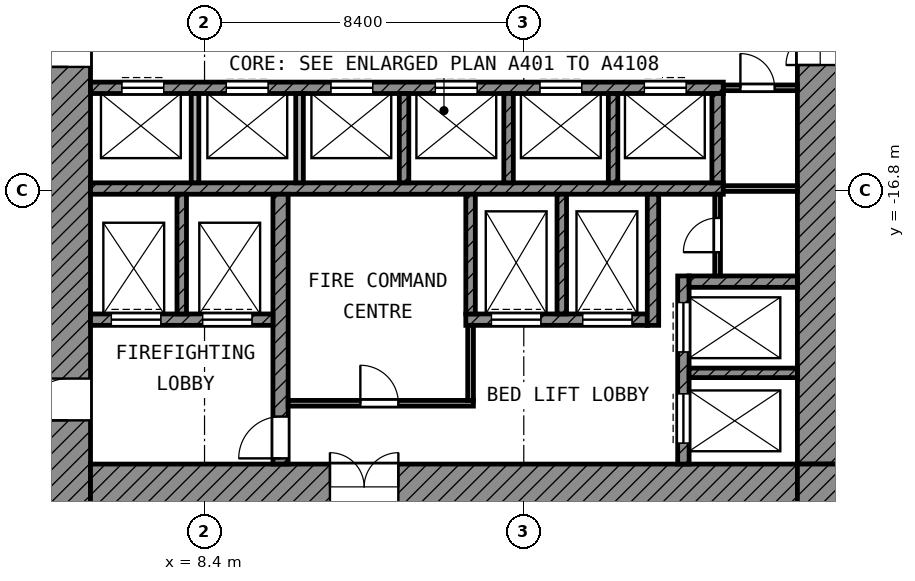
"""IFC4 building model, lengths in metres.
Left out: names, types, materials, properties, quantities, classifications, styles, units other than length and angle.
Written with IfcOpenShell. Run it as: python <this file> out.ifc"""

import sys

from ifc_helpers import new_model, si_unit, direction, frame, frame_2d, origin, place, context, subcontext, project, spatial, rectangle, extrude, element, fill, save


model = new_model("IFC4")
c1 = context("Model", 3, precision=1e-05, world=origin(), true_north=direction((0.0, 1.0)))
c2 = subcontext(c1, "Body", "Model", "MODEL_VIEW")
j1 = project(units=[si_unit("LENGTHUNIT", "METRE"), si_unit("PLANEANGLEUNIT", "RADIAN")], contexts=[c1])
p1 = place(None, origin())
s1 = spatial("IfcSite", under=j1, at=p1, CompositionType="ELEMENT")
p2 = place(p1, origin())
s2 = spatial("IfcBuilding", under=s1, at=p2, CompositionType="ELEMENT")
p3 = place(p2, origin())
s3 = spatial("IfcBuildingStorey", under=s2, at=p3, CompositionType="ELEMENT", Elevation=0.0)
p4 = place(p3, frame((4.8, -25.2, 0.0), z_axis=(0.0, 0.0, 1.0), x_axis=(0.0, 1.0, 0.0)))
e1 = element("IfcWall", 1, at=p4, inside=s3, PredefinedType="SHEAR", context=c2, shape_type="SweptSolid", body=[
    extrude(rectangle(XDim=19.8, YDim=1.2, at=frame_2d((9.9, 0.0))), origin(), (0.0, 0.0, 1.0), 6.65),
])
p5 = place(p4, frame((11.65, 0.0, 0.0)))
e2 = element("IfcOpeningElement", 2, at=p5, cuts=e1, PredefinedType="OPENING", context=c2, shape_type="SweptSolid", body=[
    extrude(rectangle(XDim=1.1, YDim=2.1, at=frame_2d((0.55, 1.05))), frame((0.0, 0.61, 0.0), z_axis=(0.0, -1.0, 0.0), x_axis=(1.0, 0.0, 0.0)), (0.0, 0.0, 1.0), 1.22),
])
p6 = place(p4, frame((2.35, 0.0, 0.0)))
e3 = element("IfcOpeningElement", 3, at=p6, cuts=e1, PredefinedType="OPENING", context=c2, shape_type="SweptSolid", body=[
    extrude(rectangle(XDim=1.1, YDim=2.1, at=frame_2d((0.55, 1.05))), frame((0.0, 0.61, 0.0), z_axis=(0.0, -1.0, 0.0), x_axis=(1.0, 0.0, 0.0)), (0.0, 0.0, 1.0), 1.22),
])
p7 = place(p3, frame((24.6, -24.0, 0.0), z_axis=(0.0, 0.0, 1.0), x_axis=(0.0, 1.0, 0.0)))
e4 = element("IfcWall", 4, at=p7, inside=s3, PredefinedType="SHEAR", context=c2, shape_type="SweptSolid", body=[
    extrude(rectangle(XDim=18.6, YDim=1.2, at=frame_2d((9.3, 0.0))), origin(), (0.0, 0.0, 1.0), 6.65),
])
p8 = place(p7, frame((10.5, 0.0, 0.0)))
e5 = element("IfcOpeningElement", 5, at=p8, cuts=e4, PredefinedType="OPENING", context=c2, shape_type="SweptSolid", body=[
    extrude(rectangle(XDim=1.8, YDim=2.1, at=frame_2d((0.9, 1.05))), frame((0.0, 0.61, 0.0), z_axis=(0.0, -1.0, 0.0), x_axis=(1.0, 0.0, 0.0)), (0.0, 0.0, 1.0), 1.22),
])
p9 = place(p3, frame((5.4, -24.6, 0.0), z_axis=(0.0, 0.0, 1.0), x_axis=(1.0, 0.0, 0.0)))
e6 = element("IfcWall", 6, at=p9, inside=s3, PredefinedType="SHEAR", context=c2, shape_type="SweptSolid", body=[
    extrude(rectangle(XDim=18.6, YDim=1.2, at=frame_2d((9.3, 0.0))), origin(), (0.0, 0.0, 1.0), 6.65),
])
p10 = place(p9, frame((6.3, 0.0, 0.0)))
e7 = element("IfcOpeningElement", 7, at=p10, cuts=e6, PredefinedType="OPENING", context=c2, shape_type="SweptSolid", body=[
    extrude(rectangle(XDim=1.8, YDim=2.1, at=frame_2d((0.9, 1.05))), frame((0.0, 0.61, 0.0), z_axis=(0.0, -1.0, 0.0), x_axis=(1.0, 0.0, 0.0)), (0.0, 0.0, 1.0), 1.22),
])
p11 = place(p3, frame((24.6, -25.2, 0.0), z_axis=(0.0, 0.0, 1.0), x_axis=(0.0, 1.0, 0.0)))
e8 = element("IfcWall", 8, at=p11, inside=s3, PredefinedType="SHEAR", context=c2, shape_type="SweptSolid", body=[
    extrude(rectangle(XDim=1.2, YDim=1.2, at=frame_2d((0.6, 0.0))), origin(), (0.0, 0.0, 1.0), 6.65),
])
p12 = place(p3, frame((5.4, -14.1, 0.0), z_axis=(0.0, 0.0, 1.0), x_axis=(1.0, 0.0, 0.0)))
e9 = element("IfcWall", 9, at=p12, inside=s3, PredefinedType="SHEAR", context=c2, shape_type="SweptSolid", body=[
    extrude(rectangle(XDim=16.65, YDim=0.3, at=frame_2d((8.325, 0.0))), origin(), (0.0, 0.0, 1.0), 6.65),
])
p13 = place(p12, frame((0.825, 0.0, 0.0)))
e10 = element("IfcOpeningElement", 10, at=p13, cuts=e9, PredefinedType="OPENING", context=c2, shape_type="SweptSolid", body=[
    extrude(rectangle(XDim=1.1, YDim=2.1, at=frame_2d((0.55, 1.05))), frame((0.0, 0.16, 0.0), z_axis=(0.0, -1.0, 0.0), x_axis=(1.0, 0.0, 0.0)), (0.0, 0.0, 1.0), 0.32),
])
p14 = place(p12, frame((3.575, 0.0, 0.0)))
e11 = element("IfcOpeningElement", 11, at=p14, cuts=e9, PredefinedType="OPENING", context=c2, shape_type="SweptSolid", body=[
    extrude(rectangle(XDim=1.1, YDim=2.1, at=frame_2d((0.55, 1.05))), frame((0.0, 0.16, 0.0), z_axis=(0.0, -1.0, 0.0), x_axis=(1.0, 0.0, 0.0)), (0.0, 0.0, 1.0), 0.32),
])
p15 = place(p12, frame((6.325, 0.0, 0.0)))
e12 = element("IfcOpeningElement", 12, at=p15, cuts=e9, PredefinedType="OPENING", context=c2, shape_type="SweptSolid", body=[
    extrude(rectangle(XDim=1.1, YDim=2.1, at=frame_2d((0.55, 1.05))), frame((0.0, 0.16, 0.0), z_axis=(0.0, -1.0, 0.0), x_axis=(1.0, 0.0, 0.0)), (0.0, 0.0, 1.0), 0.32),
])
p16 = place(p12, frame((9.075, 0.0, 0.0)))
e13 = element("IfcOpeningElement", 13, at=p16, cuts=e9, PredefinedType="OPENING", context=c2, shape_type="SweptSolid", body=[
    extrude(rectangle(XDim=1.1, YDim=2.1, at=frame_2d((0.55, 1.05))), frame((0.0, 0.16, 0.0), z_axis=(0.0, -1.0, 0.0), x_axis=(1.0, 0.0, 0.0)), (0.0, 0.0, 1.0), 0.32),
])
p17 = place(p12, frame((11.825, 0.0, 0.0)))
e14 = element("IfcOpeningElement", 14, at=p17, cuts=e9, PredefinedType="OPENING", context=c2, shape_type="SweptSolid", body=[
    extrude(rectangle(XDim=1.1, YDim=2.1, at=frame_2d((0.55, 1.05))), frame((0.0, 0.16, 0.0), z_axis=(0.0, -1.0, 0.0), x_axis=(1.0, 0.0, 0.0)), (0.0, 0.0, 1.0), 0.32),
])
p18 = place(p12, frame((14.575, 0.0, 0.0)))
e15 = element("IfcOpeningElement", 15, at=p18, cuts=e9, PredefinedType="OPENING", context=c2, shape_type="SweptSolid", body=[
    extrude(rectangle(XDim=1.1, YDim=2.1, at=frame_2d((0.55, 1.05))), frame((0.0, 0.16, 0.0), z_axis=(0.0, -1.0, 0.0), x_axis=(1.0, 0.0, 0.0)), (0.0, 0.0, 1.0), 0.32),
])
p19 = place(p3, frame((5.4, -16.75, 0.0), z_axis=(0.0, 0.0, 1.0), x_axis=(1.0, 0.0, 0.0)))
e16 = element("IfcWall", 16, at=p19, inside=s3, PredefinedType="SHEAR", context=c2, shape_type="SweptSolid", body=[
    extrude(rectangle(XDim=16.65, YDim=0.3, at=frame_2d((8.325, 0.0))), origin(), (0.0, 0.0, 1.0), 6.65),
])
p20 = place(p3, frame((5.4, -20.2, 0.0), z_axis=(0.0, 0.0, 1.0), x_axis=(1.0, 0.0, 0.0)))
e17 = element("IfcWall", 17, at=p20, inside=s3, PredefinedType="SHEAR", context=c2, shape_type="SweptSolid", body=[
    extrude(rectangle(XDim=4.8, YDim=0.3, at=frame_2d((2.4, 0.0))), origin(), (0.0, 0.0, 1.0), 6.65),
])
p21 = place(p20, frame((0.55, 0.0, 0.0)))
e18 = element("IfcOpeningElement", 18, at=p21, cuts=e17, PredefinedType="OPENING", context=c2, shape_type="SweptSolid", body=[
    extrude(rectangle(XDim=1.3, YDim=2.1, at=frame_2d((0.65, 1.05))), frame((0.0, 0.16, 0.0), z_axis=(0.0, -1.0, 0.0), x_axis=(1.0, 0.0, 0.0)), (0.0, 0.0, 1.0), 0.32),
])
p22 = place(p20, frame((2.95, 0.0, 0.0)))
e19 = element("IfcOpeningElement", 19, at=p22, cuts=e17, PredefinedType="OPENING", context=c2, shape_type="SweptSolid", body=[
    extrude(rectangle(XDim=1.3, YDim=2.1, at=frame_2d((0.65, 1.05))), frame((0.0, 0.16, 0.0), z_axis=(0.0, -1.0, 0.0), x_axis=(1.0, 0.0, 0.0)), (0.0, 0.0, 1.0), 0.32),
])
p23 = place(p3, frame((15.275, -20.2, 0.0), z_axis=(0.0, 0.0, 1.0), x_axis=(1.0, 0.0, 0.0)))
e20 = element("IfcWall", 20, at=p23, inside=s3, PredefinedType="SHEAR", context=c2, shape_type="SweptSolid", body=[
    extrude(rectangle(XDim=4.775, YDim=0.3, at=frame_2d((2.388, 0.0))), origin(), (0.0, 0.0, 1.0), 6.65),
])
p24 = place(p23, frame((0.675, 0.0, 0.0)))
e21 = element("IfcOpeningElement", 21, at=p24, cuts=e20, PredefinedType="OPENING", context=c2, shape_type="SweptSolid", body=[
    extrude(rectangle(XDim=1.3, YDim=2.1, at=frame_2d((0.65, 1.05))), frame((0.0, 0.16, 0.0), z_axis=(0.0, -1.0, 0.0), x_axis=(1.0, 0.0, 0.0)), (0.0, 0.0, 1.0), 0.32),
])
p25 = place(p23, frame((3.075, 0.0, 0.0)))
e22 = element("IfcOpeningElement", 22, at=p25, cuts=e20, PredefinedType="OPENING", context=c2, shape_type="SweptSolid", body=[
    extrude(rectangle(XDim=1.3, YDim=2.1, at=frame_2d((0.65, 1.05))), frame((0.0, 0.16, 0.0), z_axis=(0.0, -1.0, 0.0), x_axis=(1.0, 0.0, 0.0)), (0.0, 0.0, 1.0), 0.32),
])
p26 = place(p3, frame((10.4, -24.0, 0.0), z_axis=(0.0, 0.0, 1.0), x_axis=(0.0, 1.0, 0.0)))
e23 = element("IfcWall", 23, at=p26, inside=s3, PredefinedType="SHEAR", context=c2, shape_type="SweptSolid", body=[
    extrude(rectangle(XDim=7.1, YDim=0.4, at=frame_2d((3.55, 0.0))), origin(), (0.0, 0.0, 1.0), 6.65),
])
p27 = place(p26, frame((0.15, 0.0, 0.0)))
e24 = element("IfcOpeningElement", 24, at=p27, cuts=e23, PredefinedType="OPENING", context=c2, shape_type="SweptSolid", body=[
    extrude(rectangle(XDim=1.1, YDim=2.1, at=frame_2d((0.55, 1.05))), frame((0.0, 0.21, 0.0), z_axis=(0.0, -1.0, 0.0), x_axis=(1.0, 0.0, 0.0)), (0.0, 0.0, 1.0), 0.42),
])
p28 = place(p3, frame((20.2, -20.35, 0.0), z_axis=(0.0, 0.0, 1.0), x_axis=(0.0, 1.0, 0.0)))
e25 = element("IfcWall", 25, at=p28, inside=s3, PredefinedType="SHEAR", context=c2, shape_type="SweptSolid", body=[
    extrude(rectangle(XDim=3.45, YDim=0.3, at=frame_2d((1.725, 0.0))), origin(), (0.0, 0.0, 1.0), 6.65),
])
p29 = place(p3, frame((21.9, -16.6, 0.0), z_axis=(0.0, 0.0, 1.0), x_axis=(0.0, 1.0, 0.0)))
e26 = element("IfcWall", 26, at=p29, inside=s3, PredefinedType="SHEAR", context=c2, shape_type="SweptSolid", body=[
    extrude(rectangle(XDim=2.35, YDim=0.3, at=frame_2d((1.175, 0.0))), origin(), (0.0, 0.0, 1.0), 6.65),
])
p30 = place(p3, frame((21.15, -19.2, 0.0), z_axis=(0.0, 0.0, 1.0), x_axis=(1.0, 0.0, 0.0)))
e27 = element("IfcWall", 27, at=p30, inside=s3, PredefinedType="SHEAR", context=c2, shape_type="SweptSolid", body=[
    extrude(rectangle(XDim=2.85, YDim=0.3, at=frame_2d((1.425, 0.0))), origin(), (0.0, 0.0, 1.0), 6.65),
])
p31 = place(p3, frame((21.0, -24.0, 0.0), z_axis=(0.0, 0.0, 1.0), x_axis=(0.0, 1.0, 0.0)))
e28 = element("IfcWall", 28, at=p31, inside=s3, PredefinedType="SHEAR", context=c2, shape_type="SweptSolid", body=[
    extrude(rectangle(XDim=4.95, YDim=0.3, at=frame_2d((2.475, 0.0))), origin(), (0.0, 0.0, 1.0), 6.65),
])
p32 = place(p31, frame((2.95, 0.0, 0.0)))
e29 = element("IfcOpeningElement", 29, at=p32, cuts=e28, PredefinedType="OPENING", context=c2, shape_type="SweptSolid", body=[
    extrude(rectangle(XDim=1.3, YDim=2.1, at=frame_2d((0.65, 1.05))), frame((0.0, 0.16, 0.0), z_axis=(0.0, -1.0, 0.0), x_axis=(1.0, 0.0, 0.0)), (0.0, 0.0, 1.0), 0.32),
])
p33 = place(p31, frame((0.55, 0.0, 0.0)))
e30 = element("IfcOpeningElement", 30, at=p33, cuts=e28, PredefinedType="OPENING", context=c2, shape_type="SweptSolid", body=[
    extrude(rectangle(XDim=1.3, YDim=2.1, at=frame_2d((0.65, 1.05))), frame((0.0, 0.16, 0.0), z_axis=(0.0, -1.0, 0.0), x_axis=(1.0, 0.0, 0.0)), (0.0, 0.0, 1.0), 0.32),
])
p34 = place(p3, frame((21.15, -21.6, 0.0), z_axis=(0.0, 0.0, 1.0), x_axis=(1.0, 0.0, 0.0)))
e31 = element("IfcWall", 31, at=p34, inside=s3, PredefinedType="SHEAR", context=c2, shape_type="SweptSolid", body=[
    extrude(rectangle(XDim=2.85, YDim=0.25, at=frame_2d((1.425, 0.0))), origin(), (0.0, 0.0, 1.0), 6.65),
])
for number, where, z_axis, x_axis in (
    (32, (7.8, -20.05, 0.0), (0.0, 0.0, 1.0), (0.0, 1.0, 0.0)),
    (33, (15.4, -20.05, 0.0), (0.0, 0.0, 1.0), (0.0, 1.0, 0.0)),
    (34, (17.8, -20.05, 0.0), (0.0, 0.0, 1.0), (0.0, 1.0, 0.0)),
):
    element("IfcWall", number, at=place(p3, frame(where, z_axis=z_axis, x_axis=x_axis)), inside=s3, PredefinedType="SHEAR", context=c2, shape_type="SweptSolid", body=[
        extrude(rectangle(XDim=3.15, YDim=0.25, at=frame_2d((1.575, 0.0))), origin(), (0.0, 0.0, 1.0), 6.65),
    ])
for number, where, z_axis, x_axis in (
    (35, (8.15, -16.6, 0.0), (0.0, 0.0, 1.0), (0.0, 1.0, 0.0)),
    (36, (10.9, -16.6, 0.0), (0.0, 0.0, 1.0), (0.0, 1.0, 0.0)),
):
    element("IfcWall", number, at=place(p3, frame(where, z_axis=z_axis, x_axis=x_axis)), inside=s3, PredefinedType="PARTITIONING", context=c2, shape_type="SweptSolid", body=[
        extrude(rectangle(XDim=2.35, YDim=0.2, at=frame_2d((1.175, 0.0))), origin(), (0.0, 0.0, 1.0), 6.65),
    ])
for number, where, z_axis, x_axis in (
    (37, (13.65, -16.6, 0.0), (0.0, 0.0, 1.0), (0.0, 1.0, 0.0)),
    (38, (16.4, -16.6, 0.0), (0.0, 0.0, 1.0), (0.0, 1.0, 0.0)),
    (39, (19.15, -16.6, 0.0), (0.0, 0.0, 1.0), (0.0, 1.0, 0.0)),
):
    element("IfcWall", number, at=place(p3, frame(where, z_axis=z_axis, x_axis=x_axis)), inside=s3, PredefinedType="SHEAR", context=c2, shape_type="SweptSolid", body=[
        extrude(rectangle(XDim=2.35, YDim=0.25, at=frame_2d((1.175, 0.0))), origin(), (0.0, 0.0, 1.0), 6.65),
    ])
p35 = place(p3, frame((21.9, -19.05, 0.0), z_axis=(0.0, 0.0, 1.0), x_axis=(0.0, 1.0, 0.0)))
e40 = element("IfcWall", 40, at=p35, inside=s3, PredefinedType="PARTITIONING", context=c2, shape_type="SweptSolid", body=[
    extrude(rectangle(XDim=2.15, YDim=0.15, at=frame_2d((1.075, 0.0))), origin(), (0.0, 0.0, 1.0), 6.65),
])
p36 = place(p35, frame((0.625, 0.0, 0.0)))
e41 = element("IfcOpeningElement", 41, at=p36, cuts=e40, PredefinedType="OPENING", context=c2, shape_type="SweptSolid", body=[
    extrude(rectangle(XDim=0.9, YDim=2.1, at=frame_2d((0.45, 1.05))), frame((0.0, 0.085, 0.0), z_axis=(0.0, -1.0, 0.0), x_axis=(1.0, 0.0, 0.0)), (0.0, 0.0, 1.0), 0.17),
])
p37 = place(p3, frame((10.6, -22.4, 0.0), z_axis=(0.0, 0.0, 1.0), x_axis=(1.0, 0.0, 0.0)))
e42 = element("IfcWall", 42, at=p37, inside=s3, PredefinedType="PARTITIONING", context=c2, shape_type="SweptSolid", body=[
    extrude(rectangle(XDim=4.875, YDim=0.15, at=frame_2d((2.438, 0.0))), origin(), (0.0, 0.0, 1.0), 6.65),
])
p38 = place(p37, frame((1.9, 0.0, 0.0)))
e43 = element("IfcOpeningElement", 43, at=p38, cuts=e42, PredefinedType="OPENING", context=c2, shape_type="SweptSolid", body=[
    extrude(rectangle(XDim=1.0, YDim=2.1, at=frame_2d((0.5, 1.05))), frame((0.0, 0.085, 0.0), z_axis=(0.0, -1.0, 0.0), x_axis=(1.0, 0.0, 0.0)), (0.0, 0.0, 1.0), 0.17),
])
p39 = place(p3, frame((22.05, -16.75, 0.0), z_axis=(0.0, 0.0, 1.0), x_axis=(1.0, 0.0, 0.0)))
e44 = element("IfcWall", 44, at=p39, inside=s3, PredefinedType="PARTITIONING", context=c2, shape_type="SweptSolid", body=[
    extrude(rectangle(XDim=1.95, YDim=0.15, at=frame_2d((0.975, 0.0))), origin(), (0.0, 0.0, 1.0), 6.65),
])
p40 = place(p3, frame((22.05, -14.1, 0.0), z_axis=(0.0, 0.0, 1.0), x_axis=(1.0, 0.0, 0.0)))
e45 = element("IfcWall", 45, at=p40, inside=s3, PredefinedType="PARTITIONING", context=c2, shape_type="SweptSolid", body=[
    extrude(rectangle(XDim=1.95, YDim=0.15, at=frame_2d((0.975, 0.0))), origin(), (0.0, 0.0, 1.0), 6.65),
])
p41 = place(p40, frame((0.45, 0.0, 0.0)))
e46 = element("IfcOpeningElement", 46, at=p41, cuts=e45, PredefinedType="OPENING", context=c2, shape_type="SweptSolid", body=[
    extrude(rectangle(XDim=0.9, YDim=2.1, at=frame_2d((0.45, 1.05))), frame((0.0, 0.085, 0.0), z_axis=(0.0, -1.0, 0.0), x_axis=(1.0, 0.0, 0.0)), (0.0, 0.0, 1.0), 0.17),
])
p42 = place(p3, frame((15.4, -22.325, 0.0), z_axis=(0.0, 0.0, 1.0), x_axis=(0.0, 1.0, 0.0)))
e47 = element("IfcWall", 47, at=p42, inside=s3, PredefinedType="PARTITIONING", context=c2, shape_type="SweptSolid", body=[
    extrude(rectangle(XDim=1.975, YDim=0.15, at=frame_2d((0.987, 0.0))), origin(), (0.0, 0.0, 1.0), 6.65),
])
p43 = place(p13, origin())
e48 = element("IfcDoor", 48, at=p43, inside=s3, OperationType="DOUBLE_DOOR_SLIDING", PredefinedType="DOOR", context=c2, shape_type="SweptSolid", body=[
    extrude(rectangle(XDim=1.1, YDim=2.1, at=frame_2d((0.55, 1.05))), frame((0.0, 0.025, 0.0), z_axis=(0.0, -1.0, 0.0), x_axis=(1.0, 0.0, 0.0)), (0.0, 0.0, 1.0), 0.05),
])
fill(e10, e48)
p44 = place(p14, origin())
e49 = element("IfcDoor", 49, at=p44, inside=s3, OperationType="DOUBLE_DOOR_SLIDING", PredefinedType="DOOR", context=c2, shape_type="SweptSolid", body=[
    extrude(rectangle(XDim=1.1, YDim=2.1, at=frame_2d((0.55, 1.05))), frame((0.0, 0.025, 0.0), z_axis=(0.0, -1.0, 0.0), x_axis=(1.0, 0.0, 0.0)), (0.0, 0.0, 1.0), 0.05),
])
fill(e11, e49)
p45 = place(p15, origin())
e50 = element("IfcDoor", 50, at=p45, inside=s3, OperationType="DOUBLE_DOOR_SLIDING", PredefinedType="DOOR", context=c2, shape_type="SweptSolid", body=[
    extrude(rectangle(XDim=1.1, YDim=2.1, at=frame_2d((0.55, 1.05))), frame((0.0, 0.025, 0.0), z_axis=(0.0, -1.0, 0.0), x_axis=(1.0, 0.0, 0.0)), (0.0, 0.0, 1.0), 0.05),
])
fill(e12, e50)
p46 = place(p16, origin())
e51 = element("IfcDoor", 51, at=p46, inside=s3, OperationType="DOUBLE_DOOR_SLIDING", PredefinedType="DOOR", context=c2, shape_type="SweptSolid", body=[
    extrude(rectangle(XDim=1.1, YDim=2.1, at=frame_2d((0.55, 1.05))), frame((0.0, 0.025, 0.0), z_axis=(0.0, -1.0, 0.0), x_axis=(1.0, 0.0, 0.0)), (0.0, 0.0, 1.0), 0.05),
])
fill(e13, e51)
p47 = place(p17, origin())
e52 = element("IfcDoor", 52, at=p47, inside=s3, OperationType="DOUBLE_DOOR_SLIDING", PredefinedType="DOOR", context=c2, shape_type="SweptSolid", body=[
    extrude(rectangle(XDim=1.1, YDim=2.1, at=frame_2d((0.55, 1.05))), frame((0.0, 0.025, 0.0), z_axis=(0.0, -1.0, 0.0), x_axis=(1.0, 0.0, 0.0)), (0.0, 0.0, 1.0), 0.05),
])
fill(e14, e52)
p48 = place(p18, origin())
e53 = element("IfcDoor", 53, at=p48, inside=s3, OperationType="DOUBLE_DOOR_SLIDING", PredefinedType="DOOR", context=c2, shape_type="SweptSolid", body=[
    extrude(rectangle(XDim=1.1, YDim=2.1, at=frame_2d((0.55, 1.05))), frame((0.0, 0.025, 0.0), z_axis=(0.0, -1.0, 0.0), x_axis=(1.0, 0.0, 0.0)), (0.0, 0.0, 1.0), 0.05),
])
fill(e15, e53)
p49 = place(p32, origin())
e54 = element("IfcDoor", 54, at=p49, inside=s3, OperationType="DOUBLE_DOOR_SLIDING", PredefinedType="DOOR", context=c2, shape_type="SweptSolid", body=[
    extrude(rectangle(XDim=1.3, YDim=2.1, at=frame_2d((0.65, 1.05))), frame((0.0, 0.025, 0.0), z_axis=(0.0, -1.0, 0.0), x_axis=(1.0, 0.0, 0.0)), (0.0, 0.0, 1.0), 0.05),
])
fill(e29, e54)
p50 = place(p33, origin())
e55 = element("IfcDoor", 55, at=p50, inside=s3, OperationType="DOUBLE_DOOR_SLIDING", PredefinedType="DOOR", context=c2, shape_type="SweptSolid", body=[
    extrude(rectangle(XDim=1.3, YDim=2.1, at=frame_2d((0.65, 1.05))), frame((0.0, 0.025, 0.0), z_axis=(0.0, -1.0, 0.0), x_axis=(1.0, 0.0, 0.0)), (0.0, 0.0, 1.0), 0.05),
])
fill(e30, e55)
p51 = place(p24, origin())
e56 = element("IfcDoor", 56, at=p51, inside=s3, OperationType="DOUBLE_DOOR_SLIDING", PredefinedType="DOOR", context=c2, shape_type="SweptSolid", body=[
    extrude(rectangle(XDim=1.3, YDim=2.1, at=frame_2d((0.65, 1.05))), frame((0.0, 0.025, 0.0), z_axis=(0.0, -1.0, 0.0), x_axis=(1.0, 0.0, 0.0)), (0.0, 0.0, 1.0), 0.05),
])
fill(e21, e56)
p52 = place(p25, origin())
e57 = element("IfcDoor", 57, at=p52, inside=s3, OperationType="DOUBLE_DOOR_SLIDING", PredefinedType="DOOR", context=c2, shape_type="SweptSolid", body=[
    extrude(rectangle(XDim=1.3, YDim=2.1, at=frame_2d((0.65, 1.05))), frame((0.0, 0.025, 0.0), z_axis=(0.0, -1.0, 0.0), x_axis=(1.0, 0.0, 0.0)), (0.0, 0.0, 1.0), 0.05),
])
fill(e22, e57)
p53 = place(p21, origin())
e58 = element("IfcDoor", 58, at=p53, inside=s3, OperationType="DOUBLE_DOOR_SLIDING", PredefinedType="DOOR", context=c2, shape_type="SweptSolid", body=[
    extrude(rectangle(XDim=1.3, YDim=2.1, at=frame_2d((0.65, 1.05))), frame((0.0, 0.025, 0.0), z_axis=(0.0, -1.0, 0.0), x_axis=(1.0, 0.0, 0.0)), (0.0, 0.0, 1.0), 0.05),
])
fill(e18, e58)
p54 = place(p22, origin())
e59 = element("IfcDoor", 59, at=p54, inside=s3, OperationType="DOUBLE_DOOR_SLIDING", PredefinedType="DOOR", context=c2, shape_type="SweptSolid", body=[
    extrude(rectangle(XDim=1.3, YDim=2.1, at=frame_2d((0.65, 1.05))), frame((0.0, 0.025, 0.0), z_axis=(0.0, -1.0, 0.0), x_axis=(1.0, 0.0, 0.0)), (0.0, 0.0, 1.0), 0.05),
])
fill(e19, e59)
p55 = place(p5, origin())
e60 = element("IfcDoor", 60, at=p55, inside=s3, OperationType="SINGLE_SWING_LEFT", PredefinedType="DOOR", context=c2, shape_type="SweptSolid", body=[
    extrude(rectangle(XDim=1.1, YDim=2.1, at=frame_2d((0.55, 1.05))), frame((0.0, 0.025, 0.0), z_axis=(0.0, -1.0, 0.0), x_axis=(1.0, 0.0, 0.0)), (0.0, 0.0, 1.0), 0.05),
])
fill(e2, e60)
p56 = place(p6, origin())
e61 = element("IfcDoor", 61, at=p56, inside=s3, OperationType="SINGLE_SWING_LEFT", PredefinedType="DOOR", context=c2, shape_type="SweptSolid", body=[
    extrude(rectangle(XDim=1.1, YDim=2.1, at=frame_2d((0.55, 1.05))), frame((0.0, 0.025, 0.0), z_axis=(0.0, -1.0, 0.0), x_axis=(1.0, 0.0, 0.0)), (0.0, 0.0, 1.0), 0.05),
])
fill(e3, e61)
p57 = place(p27, origin())
e62 = element("IfcDoor", 62, at=p57, inside=s3, OperationType="SINGLE_SWING_LEFT", PredefinedType="DOOR", context=c2, shape_type="SweptSolid", body=[
    extrude(rectangle(XDim=1.1, YDim=2.1, at=frame_2d((0.55, 1.05))), frame((0.0, 0.025, 0.0), z_axis=(0.0, -1.0, 0.0), x_axis=(1.0, 0.0, 0.0)), (0.0, 0.0, 1.0), 0.05),
])
fill(e24, e62)
p58 = place(p8, origin())
e63 = element("IfcDoor", 63, at=p58, inside=s3, OperationType="DOUBLE_DOOR_SINGLE_SWING", PredefinedType="DOOR", context=c2, shape_type="SweptSolid", body=[
    extrude(rectangle(XDim=1.8, YDim=2.1, at=frame_2d((0.9, 1.05))), frame((0.0, 0.025, 0.0), z_axis=(0.0, -1.0, 0.0), x_axis=(1.0, 0.0, 0.0)), (0.0, 0.0, 1.0), 0.05),
])
fill(e5, e63)
p59 = place(p10, origin())
e64 = element("IfcDoor", 64, at=p59, inside=s3, OperationType="DOUBLE_DOOR_SINGLE_SWING", PredefinedType="DOOR", context=c2, shape_type="SweptSolid", body=[
    extrude(rectangle(XDim=1.8, YDim=2.1, at=frame_2d((0.9, 1.05))), frame((0.0, 0.025, 0.0), z_axis=(0.0, -1.0, 0.0), x_axis=(1.0, 0.0, 0.0)), (0.0, 0.0, 1.0), 0.05),
])
fill(e7, e64)
p60 = place(p41, origin())
e65 = element("IfcDoor", 65, at=p60, inside=s3, OperationType="SINGLE_SWING_LEFT", PredefinedType="DOOR", context=c2, shape_type="SweptSolid", body=[
    extrude(rectangle(XDim=0.9, YDim=2.1, at=frame_2d((0.45, 1.05))), frame((0.0, 0.025, 0.0), z_axis=(0.0, -1.0, 0.0), x_axis=(1.0, 0.0, 0.0)), (0.0, 0.0, 1.0), 0.05),
])
fill(e46, e65)
p61 = place(p36, origin())
e66 = element("IfcDoor", 66, at=p61, inside=s3, OperationType="SINGLE_SWING_LEFT", PredefinedType="DOOR", context=c2, shape_type="SweptSolid", body=[
    extrude(rectangle(XDim=0.9, YDim=2.1, at=frame_2d((0.45, 1.05))), frame((0.0, 0.025, 0.0), z_axis=(0.0, -1.0, 0.0), x_axis=(1.0, 0.0, 0.0)), (0.0, 0.0, 1.0), 0.05),
])
fill(e41, e66)
p62 = place(p38, origin())
e67 = element("IfcDoor", 67, at=p62, inside=s3, OperationType="SINGLE_SWING_LEFT", PredefinedType="DOOR", context=c2, shape_type="SweptSolid", body=[
    extrude(rectangle(XDim=1.0, YDim=2.1, at=frame_2d((0.5, 1.05))), frame((0.0, 0.025, 0.0), z_axis=(0.0, -1.0, 0.0), x_axis=(1.0, 0.0, 0.0)), (0.0, 0.0, 1.0), 0.05),
])
fill(e43, e67)
save(model, sys.argv[1])
